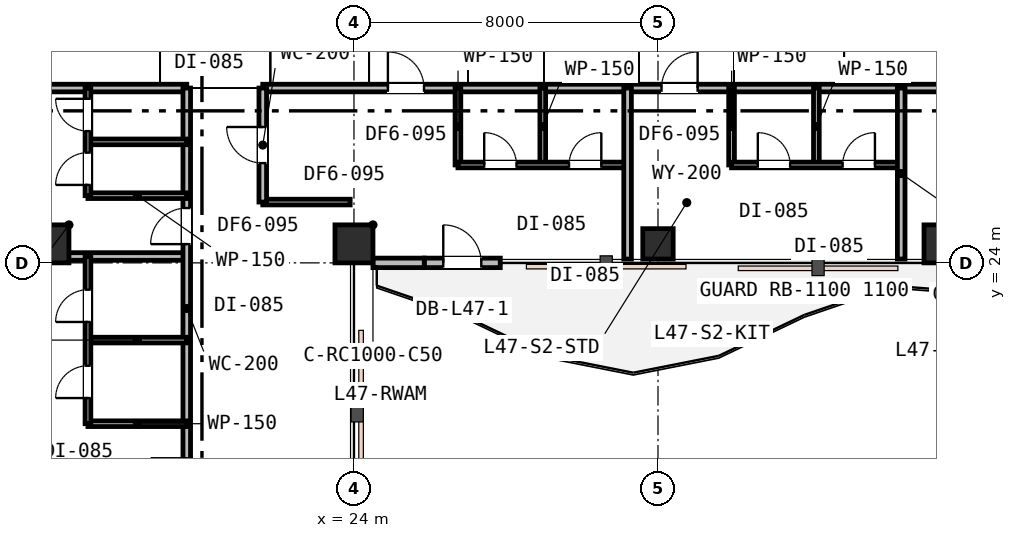
"""IFC4 building model, lengths in metres.
Left out: names, types, materials, properties, quantities, classifications, styles, units other than length and angle.
Written with IfcOpenShell. Run it as: python <this file> out.ifc"""

import sys

from ifc_helpers import new_model, si_unit, direction, frame, frame_2d, origin, origin_2d, place, context, subcontext, project, spatial, rectangle, extrude, element, fill, save


model = new_model("IFC4")
c1 = context("Model", 3, precision=1e-05, world=origin(), true_north=direction((0.0, 1.0)))
c2 = subcontext(c1, "Body", "Model", "MODEL_VIEW")
j1 = project(units=[si_unit("LENGTHUNIT", "METRE"), si_unit("PLANEANGLEUNIT", "RADIAN")], contexts=[c1])
p1 = place(None, origin())
s1 = spatial("IfcSite", under=j1, at=p1, CompositionType="ELEMENT")
p2 = place(p1, origin())
s2 = spatial("IfcBuilding", under=s1, at=p2, CompositionType="ELEMENT")
p3 = place(p2, frame((0.0, 0.0, 183.0)))
s3 = spatial("IfcBuildingStorey", under=s2, at=p3, CompositionType="ELEMENT", Elevation=183.0)
for number, where, z_axis, x_axis in (
    (1, (16.0, 24.5, 0.0), (0.0, 0.0, 1.0), (1.0, 0.0, 0.0)),
    (2, (24.0, 24.5, 0.0), (0.0, 0.0, 1.0), (1.0, 0.0, 0.0)),
):
    element("IfcColumn", number, at=place(p3, frame(where, z_axis=z_axis, x_axis=x_axis)), inside=s3, PredefinedType="COLUMN", context=c2, shape_type="SweptSolid", body=[
        extrude(rectangle(XDim=1.0, YDim=1.0, at=origin_2d()), origin(), (0.0, 0.0, 1.0), 3.6),
    ])
p4 = place(p3, frame((32.0, 24.5, 0.0), z_axis=(0.0, 0.0, 1.0), x_axis=(1.0, 0.0, 0.0)))
e3 = element("IfcColumn", 3, at=p4, inside=s3, PredefinedType="COLUMN", context=c2, shape_type="SweptSolid", body=[
    extrude(rectangle(XDim=0.8, YDim=0.8, at=origin_2d()), origin(), (0.0, 0.0, 1.0), 3.6),
])
p5 = place(p3, frame((39.5, 24.5, 0.0), z_axis=(0.0, 0.0, 1.0), x_axis=(1.0, 0.0, 0.0)))
e4 = element("IfcColumn", 4, at=p5, inside=s3, PredefinedType="COLUMN", context=c2, shape_type="SweptSolid", body=[
    extrude(rectangle(XDim=1.0, YDim=1.0, at=origin_2d()), origin(), (0.0, 0.0, 1.0), 3.6),
])
p6 = place(p3, frame((25.85, 24.0, 0.0), z_axis=(0.0, 0.0, 1.0), x_axis=(1.0, 0.0, 0.0)))
e5 = element("IfcWall", 5, at=p6, inside=s3, PredefinedType="STANDARD", context=c2, shape_type="SweptSolid", body=[
    extrude(rectangle(XDim=2.0, YDim=0.25, at=frame_2d((1.0, 0.0))), origin(), (0.0, 0.0, 1.0), 3.02),
])
p7 = place(p6, frame((0.5, 0.0, 0.0)))
e6 = element("IfcOpeningElement", 6, at=p7, cuts=e5, PredefinedType="OPENING", context=c2, shape_type="SweptSolid", body=[
    extrude(rectangle(XDim=1.0, YDim=2.15, at=frame_2d((0.5, 1.075))), frame((0.0, 0.135, 0.0), z_axis=(0.0, -1.0, 0.0), x_axis=(1.0, 0.0, 0.0)), (0.0, 0.0, 1.0), 0.27),
])
p8 = place(p3, frame((24.5, 24.0, 0.0), z_axis=(0.0, 0.0, 1.0), x_axis=(1.0, 0.0, 0.0)))
e7 = element("IfcWall", 7, at=p8, inside=s3, PredefinedType="STANDARD", context=c2, shape_type="SweptSolid", body=[
    extrude(rectangle(XDim=1.35, YDim=0.25, at=frame_2d((0.675, 0.0))), origin(), (0.0, 0.0, 1.0), 3.02),
])
p9 = place(p3, frame((15.5, 28.6, 0.0), z_axis=(0.0, 0.0, 1.0), x_axis=(1.0, 0.0, 0.0)))
e8 = element("IfcWall", 8, at=p9, inside=s3, PredefinedType="PARTITIONING", context=c2, shape_type="SweptSolid", body=[
    extrude(rectangle(XDim=4.1, YDim=0.2, at=frame_2d((2.05, 0.0))), origin(), (0.0, 0.0, 1.0), 2.92),
])
p10 = place(p3, frame((21.6, 28.6, 0.0), z_axis=(0.0, 0.0, 1.0), x_axis=(1.0, 0.0, 0.0)))
e9 = element("IfcWall", 9, at=p10, inside=s3, PredefinedType="PARTITIONING", context=c2, shape_type="SweptSolid", body=[
    extrude(rectangle(XDim=29.3, YDim=0.2, at=frame_2d((14.65, 0.0))), origin(), (0.0, 0.0, 1.0), 2.92),
])
p11 = place(p10, frame((3.293, 0.0, 0.0)))
e10 = element("IfcOpeningElement", 10, at=p11, cuts=e9, PredefinedType="OPENING", context=c2, shape_type="SweptSolid", body=[
    extrude(rectangle(XDim=0.95, YDim=2.15, at=frame_2d((0.475, 1.075))), frame((0.0, 0.11, 0.0), z_axis=(0.0, -1.0, 0.0), x_axis=(1.0, 0.0, 0.0)), (0.0, 0.0, 1.0), 0.22),
])
p12 = place(p10, frame((10.493, 0.0, 0.0)))
e11 = element("IfcOpeningElement", 11, at=p12, cuts=e9, PredefinedType="OPENING", context=c2, shape_type="SweptSolid", body=[
    extrude(rectangle(XDim=0.95, YDim=2.15, at=frame_2d((0.475, 1.075))), frame((0.0, 0.11, 0.0), z_axis=(0.0, -1.0, 0.0), x_axis=(1.0, 0.0, 0.0)), (0.0, 0.0, 1.0), 0.22),
])
p13 = place(p10, frame((19.375, 0.0, 0.0)))
e12 = element("IfcOpeningElement", 12, at=p13, cuts=e9, PredefinedType="OPENING", context=c2, shape_type="SweptSolid", body=[
    extrude(rectangle(XDim=0.95, YDim=2.15, at=frame_2d((0.475, 1.075))), frame((0.0, 0.11, 0.0), z_axis=(0.0, -1.0, 0.0), x_axis=(1.0, 0.0, 0.0)), (0.0, 0.0, 1.0), 0.22),
])
for number, where, z_axis, x_axis in (
    (13, (26.736, 26.576, 0.0), (0.0, 0.0, 1.0), (0.0, 1.0, 0.0)),
    (14, (28.968, 26.576, 0.0), (0.0, 0.0, 1.0), (0.0, 1.0, 0.0)),
):
    element("IfcWall", number, at=place(p3, frame(where, z_axis=z_axis, x_axis=x_axis)), inside=s3, PredefinedType="PARTITIONING", context=c2, shape_type="SweptSolid", body=[
        extrude(rectangle(XDim=2.024, YDim=0.15, at=frame_2d((1.012, 0.0))), origin(), (0.0, 0.0, 1.0), 3.07),
    ])
p14 = place(p3, frame((26.736, 26.576, 0.0), z_axis=(0.0, 0.0, 1.0), x_axis=(1.0, 0.0, 0.0)))
e15 = element("IfcWall", 15, at=p14, inside=s3, PredefinedType="PARTITIONING", context=c2, shape_type="SweptSolid", body=[
    extrude(rectangle(XDim=4.464, YDim=0.15, at=frame_2d((2.232, 0.0))), origin(), (0.0, 0.0, 1.0), 3.07),
])
p15 = place(p14, frame((0.691, 0.0, 0.0)))
e16 = element("IfcOpeningElement", 16, at=p15, cuts=e15, PredefinedType="OPENING", context=c2, shape_type="SweptSolid", body=[
    extrude(rectangle(XDim=0.85, YDim=2.15, at=frame_2d((0.425, 1.075))), frame((0.0, 0.085, 0.0), z_axis=(0.0, -1.0, 0.0), x_axis=(1.0, 0.0, 0.0)), (0.0, 0.0, 1.0), 0.17),
])
p16 = place(p14, frame((2.923, 0.0, 0.0)))
e17 = element("IfcOpeningElement", 17, at=p16, cuts=e15, PredefinedType="OPENING", context=c2, shape_type="SweptSolid", body=[
    extrude(rectangle(XDim=0.85, YDim=2.15, at=frame_2d((0.425, 1.075))), frame((0.0, 0.085, 0.0), z_axis=(0.0, -1.0, 0.0), x_axis=(1.0, 0.0, 0.0)), (0.0, 0.0, 1.0), 0.17),
])
p17 = place(p3, frame((31.2, 24.1, 0.0), z_axis=(0.0, 0.0, 1.0), x_axis=(0.0, 1.0, 0.0)))
e18 = element("IfcWall", 18, at=p17, inside=s3, PredefinedType="PARTITIONING", context=c2, shape_type="SweptSolid", body=[
    extrude(rectangle(XDim=4.5, YDim=0.2, at=frame_2d((2.25, 0.0))), origin(), (0.0, 0.0, 1.0), 3.02),
])
for number, where, z_axis, x_axis in (
    (19, (33.936, 26.576, 0.0), (0.0, 0.0, 1.0), (0.0, 1.0, 0.0)),
    (20, (36.168, 26.576, 0.0), (0.0, 0.0, 1.0), (0.0, 1.0, 0.0)),
):
    element("IfcWall", number, at=place(p3, frame(where, z_axis=z_axis, x_axis=x_axis)), inside=s3, PredefinedType="PARTITIONING", context=c2, shape_type="SweptSolid", body=[
        extrude(rectangle(XDim=2.024, YDim=0.15, at=frame_2d((1.012, 0.0))), origin(), (0.0, 0.0, 1.0), 3.33),
    ])
p18 = place(p3, frame((33.936, 26.576, 0.0), z_axis=(0.0, 0.0, 1.0), x_axis=(1.0, 0.0, 0.0)))
e21 = element("IfcWall", 21, at=p18, inside=s3, PredefinedType="PARTITIONING", context=c2, shape_type="SweptSolid", body=[
    extrude(rectangle(XDim=4.464, YDim=0.15, at=frame_2d((2.232, 0.0))), origin(), (0.0, 0.0, 1.0), 3.07),
])
p19 = place(p18, frame((0.691, 0.0, 0.0)))
e22 = element("IfcOpeningElement", 22, at=p19, cuts=e21, PredefinedType="OPENING", context=c2, shape_type="SweptSolid", body=[
    extrude(rectangle(XDim=0.85, YDim=2.15, at=frame_2d((0.425, 1.075))), frame((0.0, 0.085, 0.0), z_axis=(0.0, -1.0, 0.0), x_axis=(1.0, 0.0, 0.0)), (0.0, 0.0, 1.0), 0.17),
])
p20 = place(p18, frame((2.923, 0.0, 0.0)))
e23 = element("IfcOpeningElement", 23, at=p20, cuts=e21, PredefinedType="OPENING", context=c2, shape_type="SweptSolid", body=[
    extrude(rectangle(XDim=0.85, YDim=2.15, at=frame_2d((0.425, 1.075))), frame((0.0, 0.085, 0.0), z_axis=(0.0, -1.0, 0.0), x_axis=(1.0, 0.0, 0.0)), (0.0, 0.0, 1.0), 0.17),
])
p21 = place(p3, frame((38.4, 24.1, 0.0), z_axis=(0.0, 0.0, 1.0), x_axis=(0.0, 1.0, 0.0)))
e24 = element("IfcWall", 24, at=p21, inside=s3, PredefinedType="PARTITIONING", context=c2, shape_type="SweptSolid", body=[
    extrude(rectangle(XDim=4.5, YDim=0.2, at=frame_2d((2.25, 0.0))), origin(), (0.0, 0.0, 1.0), 3.02),
])
p22 = place(p3, frame((5.1, 24.168, 0.0), z_axis=(0.0, 0.0, 1.0), x_axis=(1.0, 0.0, 0.0)))
e25 = element("IfcWall", 25, at=p22, inside=s3, PredefinedType="PARTITIONING", context=c2, shape_type="SweptSolid", body=[
    extrude(rectangle(XDim=14.5, YDim=0.2, at=frame_2d((7.25, 0.0))), origin(), (0.0, 0.0, 1.0), 2.92),
])
p23 = place(p3, frame((19.6, 17.0, 0.0), z_axis=(0.0, 0.0, 1.0), x_axis=(0.0, 1.0, 0.0)))
e26 = element("IfcWall", 26, at=p23, inside=s3, PredefinedType="PARTITIONING", context=c2, shape_type="SweptSolid", body=[
    extrude(rectangle(XDim=11.6, YDim=0.2, at=frame_2d((5.8, 0.0))), origin(), (0.0, 0.0, 1.0), 2.92),
])
p24 = place(p23, frame((7.493, 0.0, 0.0)))
e27 = element("IfcOpeningElement", 27, at=p24, cuts=e26, PredefinedType="OPENING", context=c2, shape_type="SweptSolid", body=[
    extrude(rectangle(XDim=0.95, YDim=2.15, at=frame_2d((0.475, 1.075))), frame((0.0, 0.11, 0.0), z_axis=(0.0, -1.0, 0.0), x_axis=(1.0, 0.0, 0.0)), (0.0, 0.0, 1.0), 0.22),
])
p25 = place(p23, frame((0.909, 0.0, 0.0)))
e28 = element("IfcOpeningElement", 28, at=p25, cuts=e26, PredefinedType="OPENING", context=c2, shape_type="SweptSolid", body=[
    extrude(rectangle(XDim=0.95, YDim=2.15, at=frame_2d((0.475, 1.075))), frame((0.0, 0.11, 0.0), z_axis=(0.0, -1.0, 0.0), x_axis=(1.0, 0.0, 0.0)), (0.0, 0.0, 1.0), 0.22),
])
for number, where, z_axis, x_axis in (
    (29, (17.0, 25.768, 0.0), (0.0, 0.0, 1.0), (1.0, 0.0, 0.0)),
    (30, (17.0, 27.184, 0.0), (0.0, 0.0, 1.0), (1.0, 0.0, 0.0)),
):
    element("IfcWall", number, at=place(p3, frame(where, z_axis=z_axis, x_axis=x_axis)), inside=s3, PredefinedType="PARTITIONING", context=c2, shape_type="SweptSolid", body=[
        extrude(rectangle(XDim=2.6, YDim=0.15, at=frame_2d((1.3, 0.0))), origin(), (0.0, 0.0, 1.0), 3.07),
    ])
p26 = place(p3, frame((17.0, 25.768, 0.0), z_axis=(0.0, 0.0, 1.0), x_axis=(0.0, 1.0, 0.0)))
e31 = element("IfcWall", 31, at=p26, inside=s3, PredefinedType="PARTITIONING", context=c2, shape_type="SweptSolid", body=[
    extrude(rectangle(XDim=2.832, YDim=0.15, at=frame_2d((1.416, 0.0))), origin(), (0.0, 0.0, 1.0), 3.33),
])
p27 = place(p26, frame((0.283, 0.0, 0.0)))
e32 = element("IfcOpeningElement", 32, at=p27, cuts=e31, PredefinedType="OPENING", context=c2, shape_type="SweptSolid", body=[
    extrude(rectangle(XDim=0.85, YDim=2.15, at=frame_2d((0.425, 1.075))), frame((0.0, 0.085, 0.0), z_axis=(0.0, -1.0, 0.0), x_axis=(1.0, 0.0, 0.0)), (0.0, 0.0, 1.0), 0.17),
])
p28 = place(p26, frame((1.699, 0.0, 0.0)))
e33 = element("IfcOpeningElement", 33, at=p28, cuts=e31, PredefinedType="OPENING", context=c2, shape_type="SweptSolid", body=[
    extrude(rectangle(XDim=0.85, YDim=2.15, at=frame_2d((0.425, 1.075))), frame((0.0, 0.085, 0.0), z_axis=(0.0, -1.0, 0.0), x_axis=(1.0, 0.0, 0.0)), (0.0, 0.0, 1.0), 0.17),
])
for number, where, z_axis, x_axis in (
    (34, (17.0, 19.768, 0.0), (0.0, 0.0, 1.0), (1.0, 0.0, 0.0)),
    (35, (17.0, 21.968, 0.0), (0.0, 0.0, 1.0), (1.0, 0.0, 0.0)),
):
    element("IfcWall", number, at=place(p3, frame(where, z_axis=z_axis, x_axis=x_axis)), inside=s3, PredefinedType="PARTITIONING", context=c2, shape_type="SweptSolid", body=[
        extrude(rectangle(XDim=2.6, YDim=0.15, at=frame_2d((1.3, 0.0))), origin(), (0.0, 0.0, 1.0), 3.33),
    ])
p29 = place(p3, frame((17.0, 19.768, 0.0), z_axis=(0.0, 0.0, 1.0), x_axis=(0.0, 1.0, 0.0)))
e36 = element("IfcWall", 36, at=p29, inside=s3, PredefinedType="PARTITIONING", context=c2, shape_type="SweptSolid", body=[
    extrude(rectangle(XDim=4.4, YDim=0.15, at=frame_2d((2.2, 0.0))), origin(), (0.0, 0.0, 1.0), 2.92),
])
p30 = place(p29, frame((0.675, 0.0, 0.0)))
e37 = element("IfcOpeningElement", 37, at=p30, cuts=e36, PredefinedType="OPENING", context=c2, shape_type="SweptSolid", body=[
    extrude(rectangle(XDim=0.85, YDim=2.15, at=frame_2d((0.425, 1.075))), frame((0.0, 0.085, 0.0), z_axis=(0.0, -1.0, 0.0), x_axis=(1.0, 0.0, 0.0)), (0.0, 0.0, 1.0), 0.17),
])
p31 = place(p29, frame((2.677, 0.0, 0.0)))
e38 = element("IfcOpeningElement", 38, at=p31, cuts=e36, PredefinedType="OPENING", context=c2, shape_type="SweptSolid", body=[
    extrude(rectangle(XDim=0.85, YDim=2.15, at=frame_2d((0.425, 1.075))), frame((0.0, 0.085, 0.0), z_axis=(0.0, -1.0, 0.0), x_axis=(1.0, 0.0, 0.0)), (0.0, 0.0, 1.0), 0.17),
])
p32 = place(p3, frame((21.6, 25.6, 0.0), z_axis=(0.0, 0.0, 1.0), x_axis=(1.0, 0.0, 0.0)))
e39 = element("IfcWall", 39, at=p32, inside=s3, PredefinedType="PARTITIONING", context=c2, shape_type="SweptSolid", body=[
    extrude(rectangle(XDim=2.3, YDim=0.15, at=frame_2d((1.15, 0.0))), origin(), (0.0, 0.0, 1.0), 2.92),
])
p33 = place(p3, frame((21.6, 25.6, 0.0), z_axis=(0.0, 0.0, 1.0), x_axis=(0.0, 1.0, 0.0)))
e40 = element("IfcWall", 40, at=p33, inside=s3, PredefinedType="PARTITIONING", context=c2, shape_type="SweptSolid", body=[
    extrude(rectangle(XDim=3.0, YDim=0.2, at=frame_2d((1.5, 0.0))), origin(), (0.0, 0.0, 1.0), 3.07),
])
p34 = place(p33, frame((1.025, 0.0, 0.0)))
e41 = element("IfcOpeningElement", 41, at=p34, cuts=e40, PredefinedType="OPENING", context=c2, shape_type="SweptSolid", body=[
    extrude(rectangle(XDim=0.95, YDim=2.15, at=frame_2d((0.475, 1.075))), frame((0.0, 0.11, 0.0), z_axis=(0.0, -1.0, 0.0), x_axis=(1.0, 0.0, 0.0)), (0.0, 0.0, 1.0), 0.22),
])
p35 = place(p7, origin())
e42 = element("IfcDoor", 42, at=p35, inside=s3, OperationType="SINGLE_SWING_LEFT", PredefinedType="DOOR", context=c2, shape_type="SweptSolid", body=[
    extrude(rectangle(XDim=1.0, YDim=2.15, at=frame_2d((0.5, 1.075))), frame((0.0, 0.025, 0.0), z_axis=(0.0, -1.0, 0.0), x_axis=(1.0, 0.0, 0.0)), (0.0, 0.0, 1.0), 0.05),
])
fill(e6, e42)
p36 = place(p11, origin())
e43 = element("IfcDoor", 43, at=p36, inside=s3, OperationType="SINGLE_SWING_LEFT", PredefinedType="DOOR", context=c2, shape_type="SweptSolid", body=[
    extrude(rectangle(XDim=0.95, YDim=2.15, at=frame_2d((0.475, 1.075))), frame((0.0, 0.025, 0.0), z_axis=(0.0, -1.0, 0.0), x_axis=(1.0, 0.0, 0.0)), (0.0, 0.0, 1.0), 0.05),
])
fill(e10, e43)
p37 = place(p15, origin())
e44 = element("IfcDoor", 44, at=p37, inside=s3, OperationType="SINGLE_SWING_LEFT", PredefinedType="DOOR", context=c2, shape_type="SweptSolid", body=[
    extrude(rectangle(XDim=0.85, YDim=2.15, at=frame_2d((0.425, 1.075))), frame((0.0, 0.025, 0.0), z_axis=(0.0, -1.0, 0.0), x_axis=(1.0, 0.0, 0.0)), (0.0, 0.0, 1.0), 0.05),
])
fill(e16, e44)
p38 = place(p16, origin())
e45 = element("IfcDoor", 45, at=p38, inside=s3, OperationType="SINGLE_SWING_RIGHT", PredefinedType="DOOR", context=c2, shape_type="SweptSolid", body=[
    extrude(rectangle(XDim=0.85, YDim=2.15, at=frame_2d((0.425, 1.075))), frame((0.0, 0.025, 0.0), z_axis=(0.0, -1.0, 0.0), x_axis=(1.0, 0.0, 0.0)), (0.0, 0.0, 1.0), 0.05),
])
fill(e17, e45)
p39 = place(p12, origin())
e46 = element("IfcDoor", 46, at=p39, inside=s3, OperationType="SINGLE_SWING_RIGHT", PredefinedType="DOOR", context=c2, shape_type="SweptSolid", body=[
    extrude(rectangle(XDim=0.95, YDim=2.15, at=frame_2d((0.475, 1.075))), frame((0.0, 0.025, 0.0), z_axis=(0.0, -1.0, 0.0), x_axis=(1.0, 0.0, 0.0)), (0.0, 0.0, 1.0), 0.05),
])
fill(e11, e46)
p40 = place(p19, origin())
e47 = element("IfcDoor", 47, at=p40, inside=s3, OperationType="SINGLE_SWING_LEFT", PredefinedType="DOOR", context=c2, shape_type="SweptSolid", body=[
    extrude(rectangle(XDim=0.85, YDim=2.15, at=frame_2d((0.425, 1.075))), frame((0.0, 0.025, 0.0), z_axis=(0.0, -1.0, 0.0), x_axis=(1.0, 0.0, 0.0)), (0.0, 0.0, 1.0), 0.05),
])
fill(e22, e47)
p41 = place(p20, origin())
e48 = element("IfcDoor", 48, at=p41, inside=s3, OperationType="SINGLE_SWING_RIGHT", PredefinedType="DOOR", context=c2, shape_type="SweptSolid", body=[
    extrude(rectangle(XDim=0.85, YDim=2.15, at=frame_2d((0.425, 1.075))), frame((0.0, 0.025, 0.0), z_axis=(0.0, -1.0, 0.0), x_axis=(1.0, 0.0, 0.0)), (0.0, 0.0, 1.0), 0.05),
])
fill(e23, e48)
p42 = place(p24, origin())
e49 = element("IfcDoor", 49, at=p42, inside=s3, OperationType="SINGLE_SWING_LEFT", PredefinedType="DOOR", context=c2, shape_type="SweptSolid", body=[
    extrude(rectangle(XDim=0.95, YDim=2.15, at=frame_2d((0.475, 1.075))), frame((0.0, 0.025, 0.0), z_axis=(0.0, -1.0, 0.0), x_axis=(1.0, 0.0, 0.0)), (0.0, 0.0, 1.0), 0.05),
])
fill(e27, e49)
p43 = place(p27, origin())
e50 = element("IfcDoor", 50, at=p43, inside=s3, OperationType="SINGLE_SWING_LEFT", PredefinedType="DOOR", context=c2, shape_type="SweptSolid", body=[
    extrude(rectangle(XDim=0.85, YDim=2.15, at=frame_2d((0.425, 1.075))), frame((0.0, 0.025, 0.0), z_axis=(0.0, -1.0, 0.0), x_axis=(1.0, 0.0, 0.0)), (0.0, 0.0, 1.0), 0.05),
])
fill(e32, e50)
p44 = place(p28, origin())
e51 = element("IfcDoor", 51, at=p44, inside=s3, OperationType="SINGLE_SWING_RIGHT", PredefinedType="DOOR", context=c2, shape_type="SweptSolid", body=[
    extrude(rectangle(XDim=0.85, YDim=2.15, at=frame_2d((0.425, 1.075))), frame((0.0, 0.025, 0.0), z_axis=(0.0, -1.0, 0.0), x_axis=(1.0, 0.0, 0.0)), (0.0, 0.0, 1.0), 0.05),
])
fill(e33, e51)
p45 = place(p25, origin())
e52 = element("IfcDoor", 52, at=p45, inside=s3, OperationType="SINGLE_SWING_RIGHT", PredefinedType="DOOR", context=c2, shape_type="SweptSolid", body=[
    extrude(rectangle(XDim=0.95, YDim=2.15, at=frame_2d((0.475, 1.075))), frame((0.0, 0.025, 0.0), z_axis=(0.0, -1.0, 0.0), x_axis=(1.0, 0.0, 0.0)), (0.0, 0.0, 1.0), 0.05),
])
fill(e28, e52)
p46 = place(p30, origin())
e53 = element("IfcDoor", 53, at=p46, inside=s3, OperationType="SINGLE_SWING_LEFT", PredefinedType="DOOR", context=c2, shape_type="SweptSolid", body=[
    extrude(rectangle(XDim=0.85, YDim=2.15, at=frame_2d((0.425, 1.075))), frame((0.0, 0.025, 0.0), z_axis=(0.0, -1.0, 0.0), x_axis=(1.0, 0.0, 0.0)), (0.0, 0.0, 1.0), 0.05),
])
fill(e37, e53)
p47 = place(p31, origin())
e54 = element("IfcDoor", 54, at=p47, inside=s3, OperationType="SINGLE_SWING_LEFT", PredefinedType="DOOR", context=c2, shape_type="SweptSolid", body=[
    extrude(rectangle(XDim=0.85, YDim=2.15, at=frame_2d((0.425, 1.075))), frame((0.0, 0.025, 0.0), z_axis=(0.0, -1.0, 0.0), x_axis=(1.0, 0.0, 0.0)), (0.0, 0.0, 1.0), 0.05),
])
fill(e38, e54)
p48 = place(p34, origin())
e55 = element("IfcDoor", 55, at=p48, inside=s3, OperationType="SINGLE_SWING_RIGHT", PredefinedType="DOOR", context=c2, shape_type="SweptSolid", body=[
    extrude(rectangle(XDim=0.95, YDim=2.15, at=frame_2d((0.475, 1.075))), frame((0.0, 0.025, 0.0), z_axis=(0.0, -1.0, 0.0), x_axis=(1.0, 0.0, 0.0)), (0.0, 0.0, 1.0), 0.05),
])
fill(e41, e55)
save(model, sys.argv[1])
